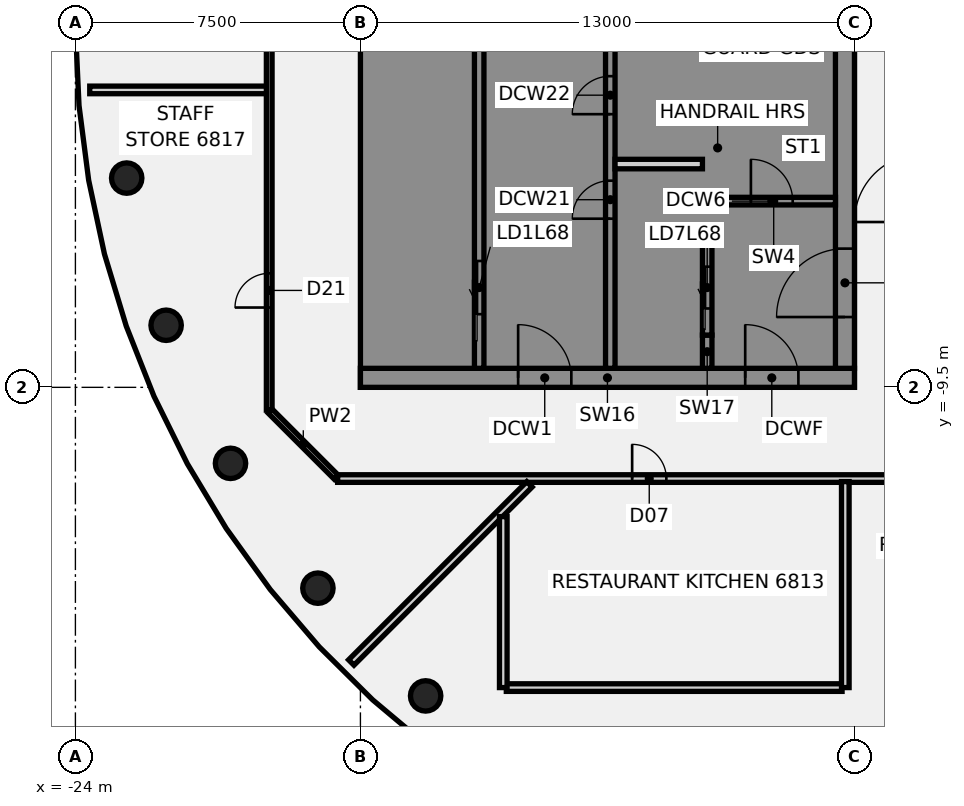
"""IFC4 building model, lengths in metres.
Left out: names, types, materials, properties, quantities, classifications, styles, units other than length and angle.
Written with IfcOpenShell. Run it as: python <this file> out.ifc"""

import sys

from ifc_helpers import new_model, si_unit, direction, frame, frame_2d, origin, origin_2d, place, context, subcontext, project, spatial, polyline, rectangle, circle, outline, extrude, element, fill, save


model = new_model("IFC4")
c1 = context("Model", 3, precision=1e-05, world=origin(), true_north=direction((0.0, 1.0)))
c2 = subcontext(c1, "Body", "Model", "MODEL_VIEW")
j1 = project(units=[si_unit("LENGTHUNIT", "METRE"), si_unit("PLANEANGLEUNIT", "RADIAN")], contexts=[c1])
p1 = place(None, origin())
s1 = spatial("IfcSite", under=j1, at=p1, CompositionType="ELEMENT")
p2 = place(p1, origin())
s2 = spatial("IfcBuilding", under=s1, at=p2, CompositionType="ELEMENT")
p3 = place(p2, frame((0.0, 0.0, 267.6)))
s3 = spatial("IfcBuildingStorey", under=s2, at=p3, CompositionType="ELEMENT", Elevation=267.6)
for number, where, z_axis, x_axis in (
    (1, (-22.651, -3.994, -0.14), (0.0, 0.0, 1.0), (1.0, 0.0, 0.0)),
    (2, (-21.613, -7.866, -0.14), (0.0, 0.0, 1.0), (1.0, 0.0, 0.0)),
    (3, (-19.919, -11.5, -0.14), (0.0, 0.0, 1.0), (1.0, 0.0, 0.0)),
    (4, (-17.619, -14.784, -0.14), (0.0, 0.0, 1.0), (1.0, 0.0, 0.0)),
    (5, (-14.784, -17.619, -0.14), (0.0, 0.0, 1.0), (1.0, 0.0, 0.0)),
):
    element("IfcColumn", number, at=place(p3, frame(where, z_axis=z_axis, x_axis=x_axis)), inside=s3, PredefinedType="COLUMN", context=c2, shape_type="SweptSolid", body=[
        extrude(circle(Radius=0.4, at=origin_2d()), origin(), (0.0, 0.0, 1.0), 3.6),
    ])
p4 = place(p3, frame((-18.872, -10.128, 0.0), z_axis=(0.0, 0.0, 1.0), x_axis=(0.707106781187, -0.707106781187, 0.0)))
e6 = element("IfcWall", 6, at=p4, inside=s3, PredefinedType="PARTITIONING", context=c2, shape_type="SweptSolid", body=[
    extrude(rectangle(XDim=2.455, YDim=0.15, at=frame_2d((1.228, 0.0))), origin(), (0.0, 0.0, 1.0), 2.864),
])
p5 = place(p3, frame((-23.623, -1.674, 0.0), z_axis=(0.0, 0.0, 1.0), x_axis=(1.0, 0.0, 0.0)))
e7 = element("IfcWall", 7, at=p5, inside=s3, PredefinedType="PARTITIONING", context=c2, shape_type="SweptSolid", body=[
    extrude(rectangle(XDim=4.668, YDim=0.2, at=frame_2d((2.334, 0.0))), origin(), (0.0, 0.0, 1.0), 2.864),
])
p6 = place(p3, frame((-17.1, -11.9, 0.0), z_axis=(0.0, 0.0, 1.0), x_axis=(1.0, 0.0, 0.0)))
e8 = element("IfcWall", 8, at=p6, inside=s3, PredefinedType="PARTITIONING", context=c2, shape_type="SweptSolid", body=[
    extrude(rectangle(XDim=34.165, YDim=0.2, at=frame_2d((17.083, 0.0))), origin(), (0.0, 0.0, 1.0), 2.864),
])
p7 = place(p6, frame((7.75, 0.0, 0.0)))
e9 = element("IfcOpeningElement", 9, at=p7, cuts=e8, PredefinedType="OPENING", context=c2, shape_type="SweptSolid", body=[
    extrude(rectangle(XDim=0.9, YDim=2.1, at=frame_2d((0.45, 1.05))), frame((0.0, 0.11, 0.0), z_axis=(0.0, -1.0, 0.0), x_axis=(1.0, 0.0, 0.0)), (0.0, 0.0, 1.0), 0.22),
])
p8 = place(p6, frame((27.541, 0.0, 0.0)))
e10 = element("IfcOpeningElement", 10, at=p8, cuts=e8, PredefinedType="OPENING", context=c2, shape_type="SweptSolid", body=[
    extrude(rectangle(XDim=0.9, YDim=2.1, at=frame_2d((0.45, 1.05))), frame((0.0, 0.11, 0.0), z_axis=(0.0, -1.0, 0.0), x_axis=(1.0, 0.0, 0.0)), (0.0, 0.0, 1.0), 0.22),
])
p9 = place(p6, frame((16.809, 0.0, 0.0)))
e11 = element("IfcOpeningElement", 11, at=p9, cuts=e8, PredefinedType="OPENING", context=c2, shape_type="SweptSolid", body=[
    extrude(rectangle(XDim=1.8, YDim=2.1, at=frame_2d((0.9, 1.05))), frame((0.0, 0.11, 0.0), z_axis=(0.0, -1.0, 0.0), x_axis=(1.0, 0.0, 0.0)), (0.0, 0.0, 1.0), 0.22),
])
p10 = place(p6, frame((24.222, 0.0, 0.0)))
e12 = element("IfcOpeningElement", 12, at=p10, cuts=e8, PredefinedType="OPENING", context=c2, shape_type="SweptSolid", body=[
    extrude(rectangle(XDim=0.9, YDim=2.1, at=frame_2d((0.45, 1.05))), frame((0.0, 0.11, 0.0), z_axis=(0.0, -1.0, 0.0), x_axis=(1.0, 0.0, 0.0)), (0.0, 0.0, 1.0), 0.22),
])
p11 = place(p6, frame((31.7, 0.0, 0.0)))
e13 = element("IfcOpeningElement", 13, at=p11, cuts=e8, PredefinedType="OPENING", context=c2, shape_type="SweptSolid", body=[
    extrude(rectangle(XDim=0.9, YDim=2.1, at=frame_2d((0.45, 1.05))), frame((0.0, 0.11, 0.0), z_axis=(0.0, -1.0, 0.0), x_axis=(1.0, 0.0, 0.0)), (0.0, 0.0, 1.0), 0.22),
])
p12 = place(p3, frame((-12.661, -17.4, 0.0), z_axis=(0.0, 0.0, 1.0), x_axis=(1.0, 0.0, 0.0)))
e14 = element("IfcWall", 14, at=p12, inside=s3, PredefinedType="PARTITIONING", context=c2, shape_type="SweptSolid", body=[
    extrude(rectangle(XDim=8.835, YDim=0.2, at=frame_2d((4.417, 0.0))), origin(), (0.0, 0.0, 1.0), 2.864),
])
p13 = place(p3, frame((-16.74, -16.74, 0.0), z_axis=(0.0, 0.0, 1.0), x_axis=(0.707106781187, 0.707106781187, 0.0)))
e15 = element("IfcWall", 15, at=p13, inside=s3, PredefinedType="PARTITIONING", context=c2, shape_type="SweptSolid", body=[
    extrude(rectangle(XDim=6.631, YDim=0.2, at=frame_2d((3.315, 0.0))), origin(), (0.0, 0.0, 1.0), 2.864),
])
p14 = place(p3, frame((-18.9, -10.1, 0.0), z_axis=(0.0, 0.0, 1.0), x_axis=(0.0, 1.0, 0.0)))
e16 = element("IfcWall", 16, at=p14, inside=s3, PredefinedType="PARTITIONING", context=c2, shape_type="SweptSolid", body=[
    extrude(rectangle(XDim=20.2, YDim=0.15, at=frame_2d((10.1, 0.0))), origin(), (0.0, 0.0, 1.0), 2.864),
])
p15 = place(p14, frame((2.7, 0.0, 0.0)))
e17 = element("IfcOpeningElement", 17, at=p15, cuts=e16, PredefinedType="OPENING", context=c2, shape_type="SweptSolid", body=[
    extrude(rectangle(XDim=0.9, YDim=2.1, at=frame_2d((0.45, 1.05))), frame((0.0, 0.085, 0.0), z_axis=(0.0, -1.0, 0.0), x_axis=(1.0, 0.0, 0.0)), (0.0, 0.0, 1.0), 0.17),
])
p16 = place(p14, frame((15.326, 0.0, 0.0)))
e18 = element("IfcOpeningElement", 18, at=p16, cuts=e16, PredefinedType="OPENING", context=c2, shape_type="SweptSolid", body=[
    extrude(rectangle(XDim=0.9, YDim=2.1, at=frame_2d((0.45, 1.05))), frame((0.0, 0.085, 0.0), z_axis=(0.0, -1.0, 0.0), x_axis=(1.0, 0.0, 0.0)), (0.0, 0.0, 1.0), 0.17),
])
p17 = place(p3, frame((-12.741, -17.4, 0.0), z_axis=(0.0, 0.0, 1.0), x_axis=(0.0, 1.0, 0.0)))
e19 = element("IfcWall", 19, at=p17, inside=s3, PredefinedType="PARTITIONING", context=c2, shape_type="SweptSolid", body=[
    extrude(rectangle(XDim=4.499, YDim=0.2, at=frame_2d((2.25, 0.0))), origin(), (0.0, 0.0, 1.0), 2.864),
])
p18 = place(p3, frame((-3.741, -17.4, 0.0), z_axis=(0.0, 0.0, 1.0), x_axis=(0.0, 1.0, 0.0)))
e20 = element("IfcWall", 20, at=p18, inside=s3, PredefinedType="PARTITIONING", context=c2, shape_type="SweptSolid", body=[
    extrude(rectangle(XDim=5.42, YDim=0.2, at=frame_2d((2.71, 0.0))), origin(), (0.0, 0.0, 1.0), 2.864),
])
p19 = place(p3, frame((-16.5, -9.25, 0.0), z_axis=(0.0, 0.0, 1.0), x_axis=(1.0, 0.0, 0.0)))
e21 = element("IfcWall", 21, at=p19, inside=s3, PredefinedType="SHEAR", context=c2, shape_type="SweptSolid", body=[
    extrude(rectangle(XDim=13.0, YDim=0.5, at=frame_2d((6.5, 0.0))), origin(), (0.0, 0.0, 1.0), 3.46),
])
p20 = place(p19, frame((4.15, 0.0, 0.0)))
e22 = element("IfcOpeningElement", 22, at=p20, cuts=e21, PredefinedType="OPENING", context=c2, shape_type="SweptSolid", body=[
    extrude(rectangle(XDim=1.4, YDim=2.1, at=frame_2d((0.7, 1.05))), frame((0.0, 0.26, 0.0), z_axis=(0.0, -1.0, 0.0), x_axis=(1.0, 0.0, 0.0)), (0.0, 0.0, 1.0), 0.52),
])
p21 = place(p19, frame((10.125, 0.0, 0.0)))
e23 = element("IfcOpeningElement", 23, at=p21, cuts=e21, PredefinedType="OPENING", context=c2, shape_type="SweptSolid", body=[
    extrude(rectangle(XDim=1.4, YDim=2.1, at=frame_2d((0.7, 1.05))), frame((0.0, 0.26, 0.0), z_axis=(0.0, -1.0, 0.0), x_axis=(1.0, 0.0, 0.0)), (0.0, 0.0, 1.0), 0.52),
])
p22 = place(p3, origin())
e24 = element("IfcWall", 24, at=p22, inside=s3, PredefinedType="SHEAR", context=c2, shape_type="SweptSolid", body=[
    extrude(outline(polyline([(-13.5, -8.125), (-16.0, -8.125), (-16.0, -5.625), (-13.5, -5.625), (-13.5, -5.375), (-16.0, -5.375), (-16.0, 5.375), (-13.5, 5.375), (-13.5, 5.625), (-16.0, 5.625), (-16.0, 8.125), (-13.5, 8.125), (-13.5, 9.0), (-16.0, 9.0), (-16.5, 9.0), (-16.5, -9.0), (-16.0, -9.0), (-13.5, -9.0), (-13.5, -8.125)])), origin(), (0.0, 0.0, 1.0), 3.46),
])
p23 = place(p3, origin())
e25 = element("IfcWall", 25, at=p23, inside=s3, PredefinedType="SHEAR", context=c2, shape_type="SweptSolid", body=[
    extrude(outline(polyline([(-9.8, -5.375), (-9.8, -5.625), (-7.5, -5.625), (-7.25, -5.625), (-7.25, 9.0), (-7.5, 9.0), (-9.8, 9.0), (-9.8, 8.125), (-7.5, 8.125), (-7.5, 5.625), (-9.8, 5.625), (-9.8, 5.375), (-7.5, 5.375), (-7.5, 2.875), (-9.8, 2.875), (-9.8, 2.625), (-7.5, 2.625), (-7.5, -5.375), (-9.8, -5.375)])), origin(), (0.0, 0.0, 1.0), 3.46),
])
p24 = place(p3, origin())
e26 = element("IfcWall", 26, at=p24, inside=s3, PredefinedType="SHEAR", context=c2, shape_type="SweptSolid", body=[
    extrude(outline(polyline([(-7.5, -8.125), (-9.55, -8.125), (-9.55, -5.625), (-9.8, -5.625), (-9.8, -8.125), (-9.8, -9.0), (-7.5, -9.0), (-7.5, -8.125)])), origin(), (0.0, 0.0, 1.0), 3.46),
])
p25 = place(p3, frame((-7.375, -9.0, 0.0), z_axis=(0.0, 0.0, 1.0), x_axis=(0.0, 1.0, 0.0)))
e27 = element("IfcWall", 27, at=p25, inside=s3, PredefinedType="SHEAR", context=c2, shape_type="SweptSolid", body=[
    extrude(rectangle(XDim=0.875, YDim=0.25, at=frame_2d((0.438, 0.0))), origin(), (0.0, 0.0, 1.0), 3.46),
])
p26 = place(p3, frame((-13.375, -9.0, 0.0), z_axis=(0.0, 0.0, 1.0), x_axis=(0.0, 1.0, 0.0)))
e28 = element("IfcWall", 28, at=p26, inside=s3, PredefinedType="SHEAR", context=c2, shape_type="SweptSolid", body=[
    extrude(rectangle(XDim=18.0, YDim=0.25, at=frame_2d((9.0, 0.0))), origin(), (0.0, 0.0, 1.0), 3.46),
])
p27 = place(p26, frame((1.425, 0.0, 0.0)))
e29 = element("IfcOpeningElement", 29, at=p27, cuts=e28, PredefinedType="OPENING", context=c2, shape_type="SweptSolid", body=[
    extrude(rectangle(XDim=1.4, YDim=2.1, at=frame_2d((0.7, 1.05))), frame((0.0, 0.135, 0.0), z_axis=(0.0, -1.0, 0.0), x_axis=(1.0, 0.0, 0.0)), (0.0, 0.0, 1.0), 0.27),
])
p28 = place(p26, frame((8.5, 0.0, 0.0)))
e30 = element("IfcOpeningElement", 30, at=p28, cuts=e28, PredefinedType="OPENING", context=c2, shape_type="SweptSolid", body=[
    extrude(rectangle(XDim=1.0, YDim=2.1, at=frame_2d((0.5, 1.05))), frame((0.0, 0.135, 0.0), z_axis=(0.0, -1.0, 0.0), x_axis=(1.0, 0.0, 0.0)), (0.0, 0.0, 1.0), 0.27),
])
p29 = place(p3, frame((-9.925, -9.0, 0.0), z_axis=(0.0, 0.0, 1.0), x_axis=(0.0, 1.0, 0.0)))
e31 = element("IfcWall", 31, at=p29, inside=s3, PredefinedType="SHEAR", context=c2, shape_type="SweptSolid", body=[
    extrude(rectangle(XDim=18.0, YDim=0.25, at=frame_2d((9.0, 0.0))), origin(), (0.0, 0.0, 1.0), 3.46),
])
p30 = place(p29, frame((12.575, 0.0, 0.0)))
e32 = element("IfcOpeningElement", 32, at=p30, cuts=e31, PredefinedType="OPENING", context=c2, shape_type="SweptSolid", body=[
    extrude(rectangle(XDim=1.1, YDim=2.1, at=frame_2d((0.55, 1.05))), frame((0.0, 0.135, 0.0), z_axis=(0.0, -1.0, 0.0), x_axis=(1.0, 0.0, 0.0)), (0.0, 0.0, 1.0), 0.27),
])
p31 = place(p29, frame((15.325, 0.0, 0.0)))
e33 = element("IfcOpeningElement", 33, at=p31, cuts=e31, PredefinedType="OPENING", context=c2, shape_type="SweptSolid", body=[
    extrude(rectangle(XDim=1.1, YDim=2.1, at=frame_2d((0.55, 1.05))), frame((0.0, 0.135, 0.0), z_axis=(0.0, -1.0, 0.0), x_axis=(1.0, 0.0, 0.0)), (0.0, 0.0, 1.0), 0.27),
])
p32 = place(p29, frame((3.938, 0.0, 0.0)))
e34 = element("IfcOpeningElement", 34, at=p32, cuts=e31, PredefinedType="OPENING", context=c2, shape_type="SweptSolid", body=[
    extrude(rectangle(XDim=1.0, YDim=2.1, at=frame_2d((0.5, 1.05))), frame((0.0, 0.135, 0.0), z_axis=(0.0, -1.0, 0.0), x_axis=(1.0, 0.0, 0.0)), (0.0, 0.0, 1.0), 0.27),
])
p33 = place(p29, frame((6.688, 0.0, 0.0)))
e35 = element("IfcOpeningElement", 35, at=p33, cuts=e31, PredefinedType="OPENING", context=c2, shape_type="SweptSolid", body=[
    extrude(rectangle(XDim=1.0, YDim=2.1, at=frame_2d((0.5, 1.05))), frame((0.0, 0.135, 0.0), z_axis=(0.0, -1.0, 0.0), x_axis=(1.0, 0.0, 0.0)), (0.0, 0.0, 1.0), 0.27),
])
p34 = place(p29, frame((9.396, 0.0, 0.0)))
e36 = element("IfcOpeningElement", 36, at=p34, cuts=e31, PredefinedType="OPENING", context=c2, shape_type="SweptSolid", body=[
    extrude(rectangle(XDim=1.0, YDim=2.1, at=frame_2d((0.5, 1.05))), frame((0.0, 0.135, 0.0), z_axis=(0.0, -1.0, 0.0), x_axis=(1.0, 0.0, 0.0)), (0.0, 0.0, 1.0), 0.27),
])
p35 = place(p29, frame((10.771, 0.0, 0.0)))
e37 = element("IfcOpeningElement", 37, at=p35, cuts=e31, PredefinedType="OPENING", context=c2, shape_type="SweptSolid", body=[
    extrude(rectangle(XDim=1.0, YDim=2.1, at=frame_2d((0.5, 1.05))), frame((0.0, 0.135, 0.0), z_axis=(0.0, -1.0, 0.0), x_axis=(1.0, 0.0, 0.0)), (0.0, 0.0, 1.0), 0.27),
])
p36 = place(p3, frame((-7.375, -8.125, 0.0), z_axis=(0.0, 0.0, 1.0), x_axis=(0.0, 1.0, 0.0)))
e38 = element("IfcWall", 38, at=p36, inside=s3, PredefinedType="SHEAR", context=c2, shape_type="SweptSolid", body=[
    extrude(rectangle(XDim=2.5, YDim=0.25, at=frame_2d((1.25, 0.0))), origin(), (0.0, 0.0, 1.0), 3.46),
])
p37 = place(p36, frame((0.7, 0.0, 0.0)))
e39 = element("IfcOpeningElement", 39, at=p37, cuts=e38, PredefinedType="OPENING", context=c2, shape_type="SweptSolid", body=[
    extrude(rectangle(XDim=1.1, YDim=2.1, at=frame_2d((0.55, 1.05))), frame((0.0, 0.135, 0.0), z_axis=(0.0, -1.0, 0.0), x_axis=(1.0, 0.0, 0.0)), (0.0, 0.0, 1.0), 0.27),
])
p38 = place(p3, frame((-3.75, -9.0, 0.0), z_axis=(0.0, 0.0, 1.0), x_axis=(0.0, 1.0, 0.0)))
e40 = element("IfcWall", 40, at=p38, inside=s3, PredefinedType="SHEAR", context=c2, shape_type="SweptSolid", body=[
    extrude(rectangle(XDim=18.0, YDim=0.5, at=frame_2d((9.0, 0.0))), origin(), (0.0, 0.0, 1.0), 3.46),
])
p39 = place(p38, frame((1.35, 0.0, 0.0)))
e41 = element("IfcOpeningElement", 41, at=p39, cuts=e40, PredefinedType="OPENING", context=c2, shape_type="SweptSolid", body=[
    extrude(rectangle(XDim=1.8, YDim=2.1, at=frame_2d((0.9, 1.05))), frame((0.0, 0.26, 0.0), z_axis=(0.0, -1.0, 0.0), x_axis=(1.0, 0.0, 0.0)), (0.0, 0.0, 1.0), 0.52),
])
p40 = place(p38, frame((12.75, 0.0, 0.0)))
e42 = element("IfcOpeningElement", 42, at=p40, cuts=e40, PredefinedType="OPENING", context=c2, shape_type="SweptSolid", body=[
    extrude(rectangle(XDim=1.0, YDim=2.1, at=frame_2d((0.5, 1.05))), frame((0.0, 0.26, 0.0), z_axis=(0.0, -1.0, 0.0), x_axis=(1.0, 0.0, 0.0)), (0.0, 0.0, 1.0), 0.52),
])
p41 = place(p38, frame((16.274, 0.0, 0.0)))
e43 = element("IfcOpeningElement", 43, at=p41, cuts=e40, PredefinedType="OPENING", context=c2, shape_type="SweptSolid", body=[
    extrude(rectangle(XDim=1.0, YDim=2.1, at=frame_2d((0.5, 1.05))), frame((0.0, 0.26, 0.0), z_axis=(0.0, -1.0, 0.0), x_axis=(1.0, 0.0, 0.0)), (0.0, 0.0, 1.0), 0.52),
])
p42 = place(p3, frame((-7.25, -4.6, 0.0), z_axis=(0.0, 0.0, 1.0), x_axis=(1.0, 0.0, 0.0)))
e44 = element("IfcWall", 44, at=p42, inside=s3, PredefinedType="SHEAR", context=c2, shape_type="SweptSolid", body=[
    extrude(rectangle(XDim=3.25, YDim=0.2, at=frame_2d((1.625, 0.0))), origin(), (0.0, 0.0, 1.0), 3.46),
])
p43 = place(p42, frame((1.025, 0.0, 0.0)))
e45 = element("IfcOpeningElement", 45, at=p43, cuts=e44, PredefinedType="OPENING", context=c2, shape_type="SweptSolid", body=[
    extrude(rectangle(XDim=1.1, YDim=2.1, at=frame_2d((0.55, 1.05))), frame((0.0, 0.11, 0.0), z_axis=(0.0, -1.0, 0.0), x_axis=(1.0, 0.0, 0.0)), (0.0, 0.0, 1.0), 0.22),
])
p44 = place(p3, frame((-9.8, -3.625, 0.0), z_axis=(0.0, 0.0, 1.0), x_axis=(1.0, 0.0, 0.0)))
e46 = element("IfcWall", 46, at=p44, inside=s3, PredefinedType="PARTITIONING", context=c2, shape_type="SweptSolid", body=[
    extrude(rectangle(XDim=2.3, YDim=0.25, at=frame_2d((1.15, 0.0))), origin(), (0.0, 0.0, 1.0), 3.46),
])
p45 = place(p7, frame((0.9, 0.0, 0.0), z_axis=(0.0, 0.0, 1.0), x_axis=(-1.0, 0.0, 0.0)))
e47 = element("IfcDoor", 47, at=p45, inside=s3, OperationType="SINGLE_SWING_LEFT", PredefinedType="DOOR", context=c2, shape_type="SweptSolid", body=[
    extrude(rectangle(XDim=0.9, YDim=2.1, at=frame_2d((0.45, 1.05))), frame((0.0, 0.025, 0.0), z_axis=(0.0, -1.0, 0.0), x_axis=(1.0, 0.0, 0.0)), (0.0, 0.0, 1.0), 0.05),
])
fill(e9, e47)
p46 = place(p15, origin())
e48 = element("IfcDoor", 48, at=p46, inside=s3, OperationType="SINGLE_SWING_RIGHT", PredefinedType="DOOR", context=c2, shape_type="SweptSolid", body=[
    extrude(rectangle(XDim=0.9, YDim=2.1, at=frame_2d((0.45, 1.05))), frame((0.0, 0.025, 0.0), z_axis=(0.0, -1.0, 0.0), x_axis=(1.0, 0.0, 0.0)), (0.0, 0.0, 1.0), 0.05),
])
fill(e17, e48)
p47 = place(p20, origin())
e49 = element("IfcDoor", 49, at=p47, inside=s3, OperationType="SINGLE_SWING_LEFT", PredefinedType="DOOR", context=c2, shape_type="SweptSolid", body=[
    extrude(rectangle(XDim=1.4, YDim=2.1, at=frame_2d((0.7, 1.05))), frame((0.0, 0.025, 0.0), z_axis=(0.0, -1.0, 0.0), x_axis=(1.0, 0.0, 0.0)), (0.0, 0.0, 1.0), 0.05),
])
fill(e22, e49)
p48 = place(p21, origin())
e50 = element("IfcDoor", 50, at=p48, inside=s3, OperationType="SINGLE_SWING_LEFT", PredefinedType="DOOR", context=c2, shape_type="SweptSolid", body=[
    extrude(rectangle(XDim=1.4, YDim=2.1, at=frame_2d((0.7, 1.05))), frame((0.0, 0.025, 0.0), z_axis=(0.0, -1.0, 0.0), x_axis=(1.0, 0.0, 0.0)), (0.0, 0.0, 1.0), 0.05),
])
fill(e23, e50)
p49 = place(p39, origin())
e51 = element("IfcDoor", 51, at=p49, inside=s3, OperationType="SINGLE_SWING_LEFT", PredefinedType="DOOR", context=c2, shape_type="SweptSolid", body=[
    extrude(rectangle(XDim=1.8, YDim=2.1, at=frame_2d((0.9, 1.05))), frame((0.0, 0.025, 0.0), z_axis=(0.0, -1.0, 0.0), x_axis=(1.0, 0.0, 0.0)), (0.0, 0.0, 1.0), 0.05),
])
fill(e41, e51)
p50 = place(p43, origin())
e52 = element("IfcDoor", 52, at=p50, inside=s3, OperationType="SINGLE_SWING_LEFT", PredefinedType="DOOR", context=c2, shape_type="SweptSolid", body=[
    extrude(rectangle(XDim=1.1, YDim=2.1, at=frame_2d((0.55, 1.05))), frame((0.0, 0.025, 0.0), z_axis=(0.0, -1.0, 0.0), x_axis=(1.0, 0.0, 0.0)), (0.0, 0.0, 1.0), 0.05),
])
fill(e45, e52)
p51 = place(p27, origin())
e53 = element("IfcDoor", 53, at=p51, inside=s3, OperationType="SLIDING_TO_LEFT", PredefinedType="DOOR", context=c2, shape_type="SweptSolid", body=[
    extrude(rectangle(XDim=1.4, YDim=2.1, at=frame_2d((0.7, 1.05))), frame((0.0, 0.025, 0.0), z_axis=(0.0, -1.0, 0.0), x_axis=(1.0, 0.0, 0.0)), (0.0, 0.0, 1.0), 0.05),
])
fill(e29, e53)
p52 = place(p37, origin())
e54 = element("IfcDoor", 54, at=p52, inside=s3, OperationType="SLIDING_TO_LEFT", PredefinedType="DOOR", context=c2, shape_type="SweptSolid", body=[
    extrude(rectangle(XDim=1.1, YDim=2.1, at=frame_2d((0.55, 1.05))), frame((0.0, 0.025, 0.0), z_axis=(0.0, -1.0, 0.0), x_axis=(1.0, 0.0, 0.0)), (0.0, 0.0, 1.0), 0.05),
])
fill(e39, e54)
p53 = place(p32, origin())
e55 = element("IfcDoor", 55, at=p53, inside=s3, OperationType="SINGLE_SWING_LEFT", PredefinedType="DOOR", context=c2, shape_type="SweptSolid", body=[
    extrude(rectangle(XDim=1.0, YDim=2.1, at=frame_2d((0.5, 1.05))), frame((0.0, 0.025, 0.0), z_axis=(0.0, -1.0, 0.0), x_axis=(1.0, 0.0, 0.0)), (0.0, 0.0, 1.0), 0.05),
])
fill(e34, e55)
p54 = place(p33, origin())
e56 = element("IfcDoor", 56, at=p54, inside=s3, OperationType="SINGLE_SWING_LEFT", PredefinedType="DOOR", context=c2, shape_type="SweptSolid", body=[
    extrude(rectangle(XDim=1.0, YDim=2.1, at=frame_2d((0.5, 1.05))), frame((0.0, 0.025, 0.0), z_axis=(0.0, -1.0, 0.0), x_axis=(1.0, 0.0, 0.0)), (0.0, 0.0, 1.0), 0.05),
])
fill(e35, e56)
save(model, sys.argv[1])
